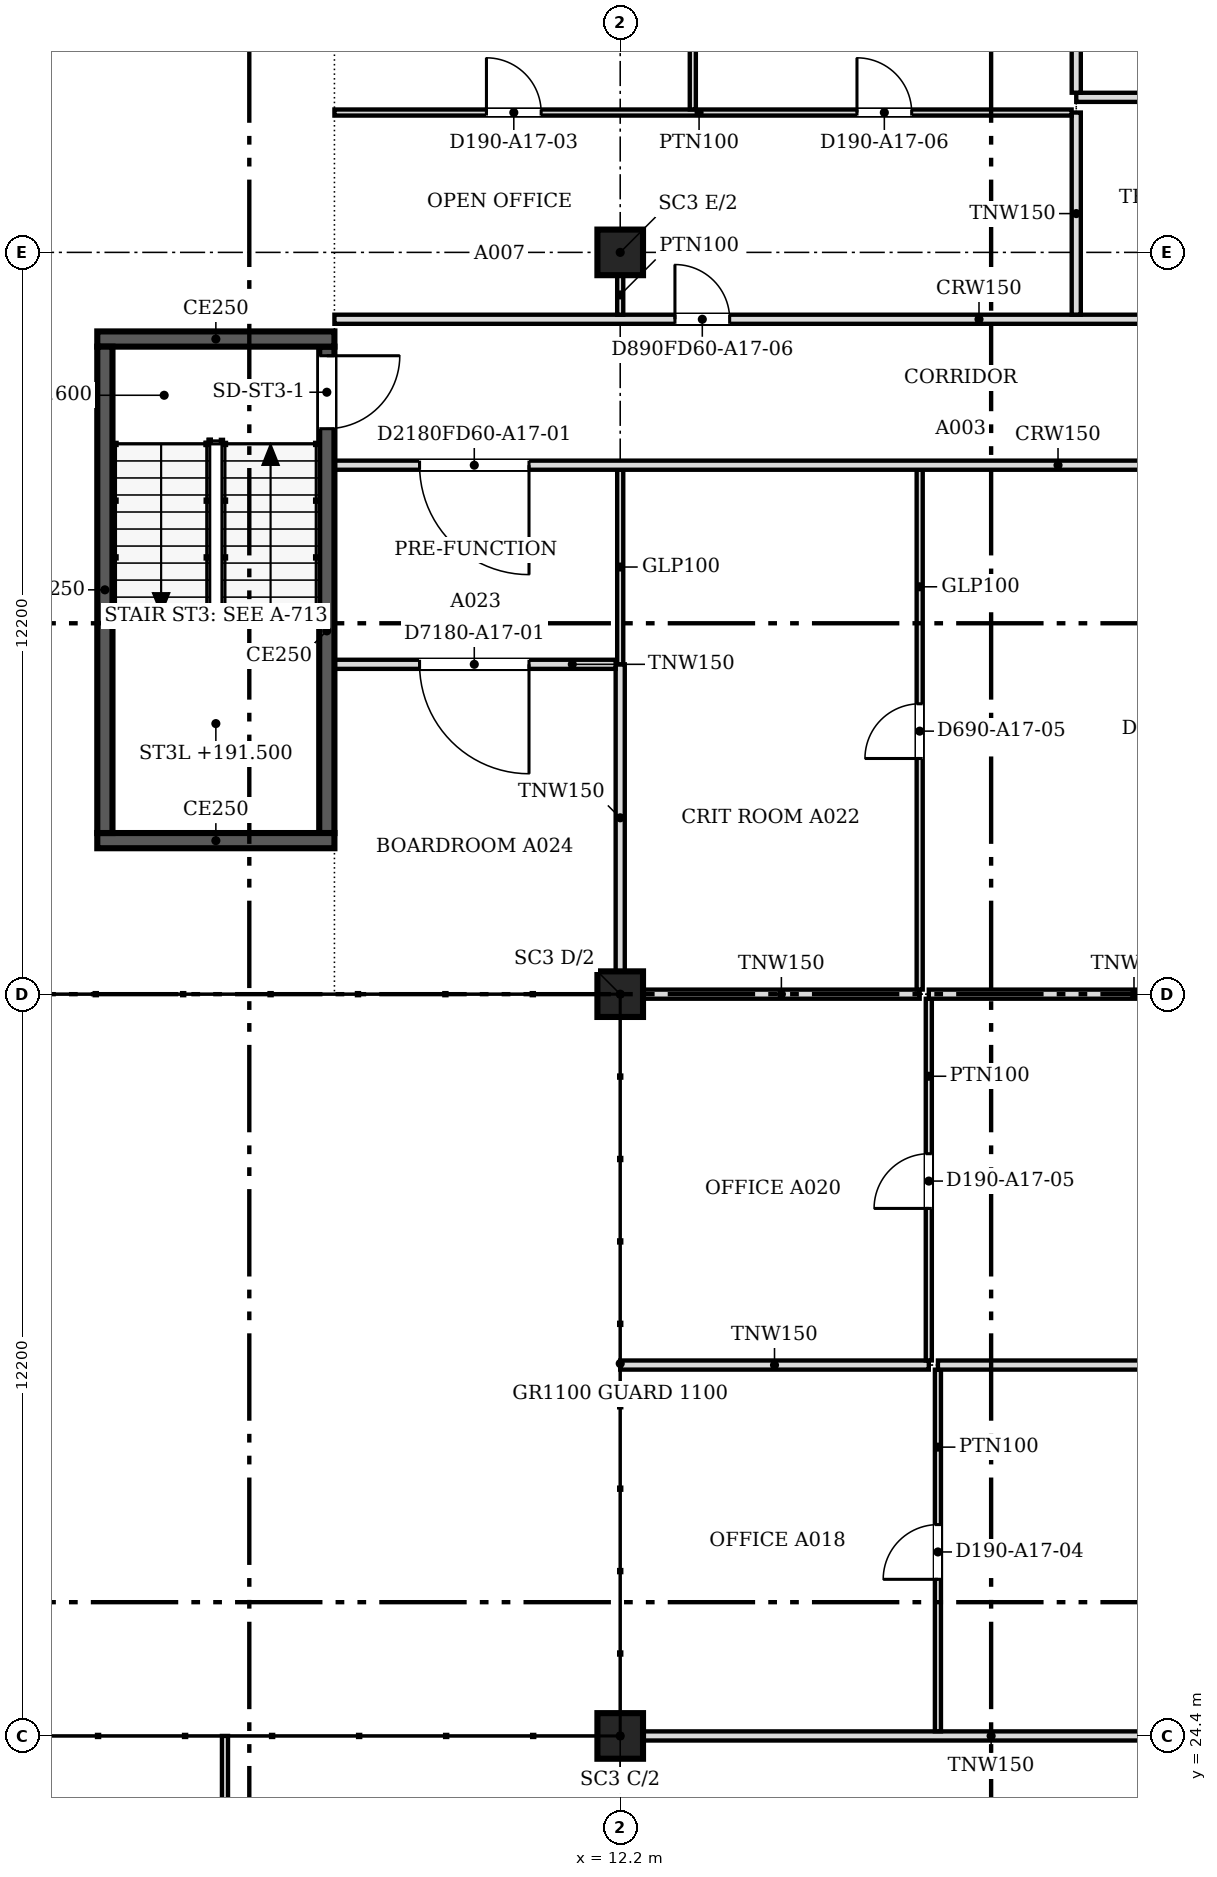
"""IFC4 building model, lengths in metres.
Left out: names, types, materials, properties, quantities, classifications, styles, units other than length and angle.
Written with IfcOpenShell. Run it as: python <this file> out.ifc"""

import sys

from ifc_helpers import new_model, si_unit, direction, frame, frame_2d, origin, origin_2d, place, context, subcontext, project, spatial, polyline, rectangle, outline, extrude, faceted_brep, source, transform, mapped, element, fill, save


model = new_model("IFC4")
c1 = context("Model", 3, precision=1e-05, world=origin(), true_north=direction((0.0, 1.0)))
c2 = subcontext(c1, "Body", "Model", "MODEL_VIEW")
j1 = project(units=[si_unit("LENGTHUNIT", "METRE"), si_unit("PLANEANGLEUNIT", "RADIAN")], contexts=[c1])
p1 = place(None, origin())
s1 = spatial("IfcSite", under=j1, at=p1, CompositionType="ELEMENT")
p2 = place(p1, origin())
s2 = spatial("IfcBuilding", under=s1, at=p2, CompositionType="ELEMENT")
p3 = place(p2, frame((0.0, 0.0, 189.6)))
s3 = spatial("IfcBuildingStorey", under=s2, at=p3, CompositionType="ELEMENT", Elevation=189.6)
for number, where, z_axis, x_axis in (
    (1, (12.2, 24.4, 0.0), (0.0, 0.0, 1.0), (1.0, 0.0, 0.0)),
    (2, (12.2, 36.6, 0.0), (0.0, 0.0, 1.0), (1.0, 0.0, 0.0)),
    (3, (12.2, 48.8, 0.0), (0.0, 0.0, 1.0), (1.0, 0.0, 0.0)),
):
    element("IfcColumn", number, at=place(p3, frame(where, z_axis=z_axis, x_axis=x_axis)), inside=s3, PredefinedType="COLUMN", context=c2, shape_type="SweptSolid", body=[
        extrude(rectangle(XDim=0.75, YDim=0.75, at=origin_2d()), origin(), (0.0, 0.0, 1.0), 3.55),
    ])
m1 = source(origin(), c2, "Body", "Brep", [
    faceted_brep([(0.053, -0.25, 0.0), (2.997, -0.25, 3.8), (0.053, -0.25, 7.6), (0.0, -0.25, 7.532), (0.0, -0.25, 0.068), (0.106, 0.25, 7.531), (2.944, 0.25, 3.868), (2.944, 0.25, 3.732), (0.106, 0.25, 0.068), (2.997, 0.0, 3.8), (0.053, 0.0, 0.0), (0.053, 0.0, 7.6)], [[[0, 1, 2, 3, 4]], [[5, 6, 7, 8]], [[8, 7, 9, 1, 0, 10]], [[6, 5, 11, 2, 1, 9]], [[3, 2, 11]], [[10, 0, 4]], [[8, 10, 4, 3, 11, 5]], [[7, 6, 9]]]),
])
p4 = place(p3, frame((3.431, 53.625, -3.8), z_axis=(0.0, 0.0, 1.0), x_axis=(-0.707106781187, -0.707106781187, 0.0)))
e4 = element("IfcWall", 4, at=p4, inside=s3, PredefinedType="SOLIDWALL", context=c2, shape_type="MappedRepresentation", body=[
    mapped(m1, transform((0.0, 0.0, 0.0), scale=1.0)),
])
m2 = source(origin(), c2, "Body", "SweptSolid", [
    extrude(outline(polyline([(0.253, 0.666), (2.681, 3.8), (0.253, 6.934), (0.253, 0.666)])), frame((0.0, 0.26, 0.0), z_axis=(0.0, -1.0, 0.0), x_axis=(1.0, 0.0, 0.0)), (0.0, 0.0, 1.0), 0.52),
])
p5 = place(p4, origin())
e5 = element("IfcOpeningElement", 5, at=p5, cuts=e4, PredefinedType="OPENING", context=c2, shape_type="MappedRepresentation", body=[
    mapped(m2, transform((0.0, 0.0, 0.0), scale=1.0)),
])
m3 = source(origin(), c2, "Body", "Brep", [
    faceted_brep([(2.944, -0.25, 0.0), (2.997, -0.25, 0.068), (2.997, -0.25, 3.8), (0.0, -0.25, 3.8), (0.053, 0.25, 3.8), (2.891, 0.25, 3.8), (2.891, 0.25, 0.068), (0.053, 0.25, 3.731), (2.944, 0.0, 0.0), (0.0, 0.0, 3.8)], [[[0, 1, 2, 3]], [[4, 5, 6, 7]], [[1, 0, 8]], [[5, 4, 9, 3, 2]], [[7, 6, 8, 0, 3, 9]], [[7, 9, 4]], [[1, 8, 6, 5, 2]]]),
])
p6 = place(p3, frame((3.394, 53.588, 0.0), z_axis=(0.0, 0.0, 1.0), x_axis=(-0.707106781187, -0.707106781187, 0.0)))
e6 = element("IfcWall", 6, at=p6, inside=s3, PredefinedType="SOLIDWALL", context=c2, shape_type="MappedRepresentation", body=[
    mapped(m3, transform((0.0, 0.0, 0.0), scale=1.0)),
])
m4 = source(origin(), c2, "Body", "SweptSolid", [
    extrude(outline(polyline([(2.744, 3.55), (0.51, 3.55), (2.744, 0.666), (2.744, 3.55)])), frame((0.0, 0.26, 0.0), z_axis=(0.0, -1.0, 0.0), x_axis=(1.0, 0.0, 0.0)), (0.0, 0.0, 1.0), 0.52),
])
p7 = place(p6, origin())
e7 = element("IfcOpeningElement", 7, at=p7, cuts=e6, PredefinedType="OPENING", context=c2, shape_type="MappedRepresentation", body=[
    mapped(m4, transform((0.0, 0.0, 0.0), scale=1.0)),
])
p8 = place(p3, frame((7.5, 39.125, 0.0), z_axis=(0.0, 0.0, 1.0), x_axis=(-1.0, 0.0, 0.0)))
e8 = element("IfcWall", 8, at=p8, inside=s3, PredefinedType="SOLIDWALL", context=c2, shape_type="SweptSolid", body=[
    extrude(rectangle(XDim=3.9, YDim=0.25, at=frame_2d((1.95, 0.0))), origin(), (0.0, 0.0, 1.0), 3.8),
])
p9 = place(p3, frame((3.725, 39.25, 0.0), z_axis=(0.0, 0.0, 1.0), x_axis=(0.0, 1.0, 0.0)))
e9 = element("IfcWall", 9, at=p9, inside=s3, PredefinedType="SOLIDWALL", context=c2, shape_type="SweptSolid", body=[
    extrude(rectangle(XDim=8.0, YDim=0.25, at=frame_2d((4.0, 0.0))), origin(), (0.0, 0.0, 1.0), 3.8),
])
p10 = place(p3, frame((3.6, 47.375, 0.0), z_axis=(0.0, 0.0, 1.0), x_axis=(1.0, 0.0, 0.0)))
e10 = element("IfcWall", 10, at=p10, inside=s3, PredefinedType="SOLIDWALL", context=c2, shape_type="SweptSolid", body=[
    extrude(rectangle(XDim=3.9, YDim=0.25, at=frame_2d((1.95, 0.0))), origin(), (0.0, 0.0, 1.0), 3.8),
])
p11 = place(p3, frame((7.375, 47.25, 0.0), z_axis=(0.0, 0.0, 1.0), x_axis=(0.0, -1.0, 0.0)))
e11 = element("IfcWall", 11, at=p11, inside=s3, PredefinedType="SOLIDWALL", context=c2, shape_type="SweptSolid", body=[
    extrude(rectangle(XDim=8.0, YDim=0.25, at=frame_2d((4.0, 0.0))), origin(), (0.0, 0.0, 1.0), 3.8),
])
m5 = source(origin(), c2, "Body", "SweptSolid", [
    extrude(rectangle(XDim=1.2, YDim=2.1, at=frame_2d((0.6, 1.05))), frame((0.0, 0.135, 0.0), z_axis=(0.0, -1.0, 0.0), x_axis=(1.0, 0.0, 0.0)), (0.0, 0.0, 1.0), 0.27),
])
p12 = place(p11, frame((0.15, 0.0, 0.0)))
e12 = element("IfcOpeningElement", 12, at=p12, cuts=e11, PredefinedType="OPENING", context=c2, shape_type="MappedRepresentation", body=[
    mapped(m5, transform((0.0, 0.0, 0.0), scale=1.0)),
])
p13 = place(p3, frame((5.7, 18.99, 0.0), z_axis=(0.0, 0.0, 1.0), x_axis=(0.0, 1.0, 0.0)))
e13 = element("IfcWall", 13, at=p13, inside=s3, PredefinedType="PARTITIONING", context=c2, shape_type="SweptSolid", body=[
    extrude(rectangle(XDim=5.41, YDim=0.1, at=frame_2d((2.705, 0.0))), origin(), (0.0, 0.0, 1.0), 2.947),
])
m6 = source(origin(), c2, "Body", "SweptSolid", [
    extrude(rectangle(XDim=0.9, YDim=2.1, at=frame_2d((0.45, 1.05))), frame((0.0, 0.06, 0.0), z_axis=(0.0, -1.0, 0.0), x_axis=(1.0, 0.0, 0.0)), (0.0, 0.0, 1.0), 0.12),
])
p14 = place(p13, frame((2.3, 0.0, 0.0)))
e14 = element("IfcOpeningElement", 14, at=p14, cuts=e13, PredefinedType="OPENING", context=c2, shape_type="MappedRepresentation", body=[
    mapped(m6, transform((0.0, 0.0, 0.0), scale=1.0)),
])
p15 = place(p3, frame((12.576, 24.4, 0.0), z_axis=(0.0, 0.0, 1.0), x_axis=(1.0, 0.0, 0.0)))
e15 = element("IfcWall", 15, at=p15, inside=s3, PredefinedType="PARTITIONING", context=c2, shape_type="SweptSolid", body=[
    extrude(rectangle(XDim=11.448, YDim=0.15, at=frame_2d((5.724, 0.0))), origin(), (0.0, 0.0, 1.0), 2.947),
])
p16 = place(p3, frame((17.425, 24.476, 0.0), z_axis=(0.0, 0.0, 1.0), x_axis=(0.0, 1.0, 0.0)))
e16 = element("IfcWall", 16, at=p16, inside=s3, PredefinedType="PARTITIONING", context=c2, shape_type="SweptSolid", body=[
    extrude(rectangle(XDim=5.948, YDim=0.1, at=frame_2d((2.974, 0.0))), origin(), (0.0, 0.0, 1.0), 2.947),
])
p17 = place(p16, frame((2.5, 0.0, 0.0)))
e17 = element("IfcOpeningElement", 17, at=p17, cuts=e16, PredefinedType="OPENING", context=c2, shape_type="MappedRepresentation", body=[
    mapped(m6, transform((0.0, 0.0, 0.0), scale=1.0)),
])
p18 = place(p3, frame((12.2, 30.5, 0.0), z_axis=(0.0, 0.0, 1.0), x_axis=(1.0, 0.0, 0.0)))
e18 = element("IfcWall", 18, at=p18, inside=s3, PredefinedType="PARTITIONING", context=c2, shape_type="SweptSolid", body=[
    extrude(rectangle(XDim=5.075, YDim=0.15, at=frame_2d((2.538, 0.0))), origin(), (0.0, 0.0, 1.0), 2.947),
])
p19 = place(p3, frame((17.425, 30.5, 0.0), z_axis=(0.0, 0.0, 1.0), x_axis=(1.0, 0.0, 0.0)))
e19 = element("IfcWall", 19, at=p19, inside=s3, PredefinedType="PARTITIONING", context=c2, shape_type="SweptSolid", body=[
    extrude(rectangle(XDim=10.599, YDim=0.15, at=frame_2d((5.299, 0.0))), origin(), (0.0, 0.0, 1.0), 2.947),
])
p20 = place(p3, frame((17.275, 30.576, 0.0), z_axis=(0.0, 0.0, 1.0), x_axis=(0.0, 1.0, 0.0)))
e20 = element("IfcWall", 20, at=p20, inside=s3, PredefinedType="PARTITIONING", context=c2, shape_type="SweptSolid", body=[
    extrude(rectangle(XDim=5.948, YDim=0.1, at=frame_2d((2.974, 0.0))), origin(), (0.0, 0.0, 1.0), 2.947),
])
p21 = place(p20, frame((2.5, 0.0, 0.0)))
e21 = element("IfcOpeningElement", 21, at=p21, cuts=e20, PredefinedType="OPENING", context=c2, shape_type="MappedRepresentation", body=[
    mapped(m6, transform((0.0, 0.0, 0.0), scale=1.0)),
])
p22 = place(p3, frame((12.576, 36.6, 0.0), z_axis=(0.0, 0.0, 1.0), x_axis=(1.0, 0.0, 0.0)))
e22 = element("IfcWall", 22, at=p22, inside=s3, PredefinedType="PARTITIONING", context=c2, shape_type="SweptSolid", body=[
    extrude(rectangle(XDim=4.549, YDim=0.15, at=frame_2d((2.274, 0.0))), origin(), (0.0, 0.0, 1.0), 2.947),
])
p23 = place(p3, frame((17.275, 36.6, 0.0), z_axis=(0.0, 0.0, 1.0), x_axis=(1.0, 0.0, 0.0)))
e23 = element("IfcWall", 23, at=p23, inside=s3, PredefinedType="PARTITIONING", context=c2, shape_type="SweptSolid", body=[
    extrude(rectangle(XDim=6.749, YDim=0.15, at=frame_2d((3.375, 0.0))), origin(), (0.0, 0.0, 1.0), 2.947),
])
p24 = place(p3, frame((17.125, 36.676, 0.0), z_axis=(0.0, 0.0, 1.0), x_axis=(0.0, 1.0, 0.0)))
e24 = element("IfcWall", 24, at=p24, inside=s3, PredefinedType="PARTITIONING", context=c2, shape_type="SweptSolid", body=[
    extrude(rectangle(XDim=8.548, YDim=0.1, at=frame_2d((4.274, 0.0))), origin(), (0.0, 0.0, 1.0), 2.947),
])
p25 = place(p24, frame((3.8, 0.0, 0.0)))
e25 = element("IfcOpeningElement", 25, at=p25, cuts=e24, PredefinedType="OPENING", context=c2, shape_type="MappedRepresentation", body=[
    mapped(m6, transform((0.0, 0.0, 0.0), scale=1.0)),
])
p26 = place(p3, frame((12.2, 36.976, 0.0), z_axis=(0.0, 0.0, 1.0), x_axis=(0.0, 1.0, 0.0)))
e26 = element("IfcWall", 26, at=p26, inside=s3, PredefinedType="PARTITIONING", context=c2, shape_type="SweptSolid", body=[
    extrude(rectangle(XDim=5.049, YDim=0.15, at=frame_2d((2.524, 0.0))), origin(), (0.0, 0.0, 1.0), 2.947),
])
p27 = place(p3, frame((12.124, 42.025, 0.0), z_axis=(0.0, 0.0, 1.0), x_axis=(-1.0, 0.0, 0.0)))
e27 = element("IfcWall", 27, at=p27, inside=s3, PredefinedType="PARTITIONING", context=c2, shape_type="SweptSolid", body=[
    extrude(rectangle(XDim=4.624, YDim=0.15, at=frame_2d((2.312, 0.0))), origin(), (0.0, 0.0, 1.0), 2.947),
])
m7 = source(origin(), c2, "Body", "SweptSolid", [
    extrude(rectangle(XDim=1.8, YDim=2.1, at=frame_2d((0.9, 1.05))), frame((0.0, 0.085, 0.0), z_axis=(0.0, -1.0, 0.0), x_axis=(1.0, 0.0, 0.0)), (0.0, 0.0, 1.0), 0.17),
])
p28 = place(p27, frame((1.424, 0.0, 0.0)))
e28 = element("IfcOpeningElement", 28, at=p28, cuts=e27, PredefinedType="OPENING", context=c2, shape_type="MappedRepresentation", body=[
    mapped(m7, transform((0.0, 0.0, 0.0), scale=1.0)),
])
p29 = place(p3, frame((12.2, 42.026, 0.0), z_axis=(0.0, 0.0, 1.0), x_axis=(0.0, 1.0, 0.0)))
e29 = element("IfcWall", 29, at=p29, inside=s3, PredefinedType="PARTITIONING", context=c2, shape_type="SweptSolid", body=[
    extrude(rectangle(XDim=3.198, YDim=0.1, at=frame_2d((1.599, 0.0))), origin(), (0.0, 0.0, 1.0), 2.947),
])
p30 = place(p3, frame((28.1, 45.3, 0.0), z_axis=(0.0, 0.0, 1.0), x_axis=(-1.0, 0.0, 0.0)))
e30 = element("IfcWall", 30, at=p30, inside=s3, PredefinedType="PARTITIONING", context=c2, shape_type="SweptSolid", body=[
    extrude(rectangle(XDim=20.6, YDim=0.15, at=frame_2d((10.3, 0.0))), origin(), (0.0, 0.0, 1.0), 2.947),
])
p31 = place(p30, frame((17.4, 0.0, 0.0)))
e31 = element("IfcOpeningElement", 31, at=p31, cuts=e30, PredefinedType="OPENING", context=c2, shape_type="MappedRepresentation", body=[
    mapped(m7, transform((0.0, 0.0, 0.0), scale=1.0)),
])
p32 = place(p3, frame((7.5, 47.7, 0.0), z_axis=(0.0, 0.0, 1.0), x_axis=(1.0, 0.0, 0.0)))
e32 = element("IfcWall", 32, at=p32, inside=s3, PredefinedType="PARTITIONING", context=c2, shape_type="SweptSolid", body=[
    extrude(rectangle(XDim=20.6, YDim=0.15, at=frame_2d((10.3, 0.0))), origin(), (0.0, 0.0, 1.0), 2.947),
])
p33 = place(p32, frame((14.701, 0.0, 0.0)))
e33 = element("IfcOpeningElement", 33, at=p33, cuts=e32, PredefinedType="OPENING", context=c2, shape_type="MappedRepresentation", body=[
    mapped(m7, transform((0.0, 0.0, 0.0), scale=1.0)),
])
m8 = source(origin(), c2, "Body", "SweptSolid", [
    extrude(rectangle(XDim=0.9, YDim=2.1, at=frame_2d((0.45, 1.05))), frame((0.0, 0.085, 0.0), z_axis=(0.0, -1.0, 0.0), x_axis=(1.0, 0.0, 0.0)), (0.0, 0.0, 1.0), 0.17),
])
p34 = place(p32, frame((5.6, 0.0, 0.0)))
e34 = element("IfcOpeningElement", 34, at=p34, cuts=e32, PredefinedType="OPENING", context=c2, shape_type="MappedRepresentation", body=[
    mapped(m8, transform((0.0, 0.0, 0.0), scale=1.0)),
])
p35 = place(p3, frame((19.7, 47.776, 0.0), z_axis=(0.0, 0.0, 1.0), x_axis=(0.0, 1.0, 0.0)))
e35 = element("IfcWall", 35, at=p35, inside=s3, PredefinedType="PARTITIONING", context=c2, shape_type="SweptSolid", body=[
    extrude(rectangle(XDim=3.324, YDim=0.15, at=frame_2d((1.662, 0.0))), origin(), (0.0, 0.0, 1.0), 2.947),
])
p36 = place(p3, frame((12.2, 48.425, 0.0), z_axis=(0.0, 0.0, 1.0), x_axis=(0.0, -1.0, 0.0)))
e36 = element("IfcWall", 36, at=p36, inside=s3, PredefinedType="PARTITIONING", context=c2, shape_type="SweptSolid", body=[
    extrude(rectangle(XDim=0.65, YDim=0.1, at=frame_2d((0.325, 0.0))), origin(), (0.0, 0.0, 1.0), 2.947),
])
p37 = place(p3, frame((7.5, 51.1, 0.0), z_axis=(0.0, 0.0, 1.0), x_axis=(1.0, 0.0, 0.0)))
e37 = element("IfcWall", 37, at=p37, inside=s3, PredefinedType="PARTITIONING", context=c2, shape_type="SweptSolid", body=[
    extrude(rectangle(XDim=12.124, YDim=0.1, at=frame_2d((6.062, 0.0))), origin(), (0.0, 0.0, 1.0), 2.947),
])
p38 = place(p37, frame((2.5, 0.0, 0.0)))
e38 = element("IfcOpeningElement", 38, at=p38, cuts=e37, PredefinedType="OPENING", context=c2, shape_type="MappedRepresentation", body=[
    mapped(m6, transform((0.0, 0.0, 0.0), scale=1.0)),
])
p39 = place(p37, frame((8.594, 0.0, 0.0)))
e39 = element("IfcOpeningElement", 39, at=p39, cuts=e37, PredefinedType="OPENING", context=c2, shape_type="MappedRepresentation", body=[
    mapped(m6, transform((0.0, 0.0, 0.0), scale=1.0)),
])
p40 = place(p3, frame((13.394, 51.151, 0.0), z_axis=(0.0, 0.0, 1.0), x_axis=(0.0, 1.0, 0.0)))
e40 = element("IfcWall", 40, at=p40, inside=s3, PredefinedType="PARTITIONING", context=c2, shape_type="SweptSolid", body=[
    extrude(rectangle(XDim=3.249, YDim=0.1, at=frame_2d((1.625, 0.0))), origin(), (0.0, 0.0, 1.0), 2.947),
])
p41 = place(p3, frame((19.7, 51.35, 0.0), z_axis=(0.0, 0.0, 1.0), x_axis=(1.0, 0.0, 0.0)))
e41 = element("IfcWall", 41, at=p41, inside=s3, PredefinedType="PARTITIONING", context=c2, shape_type="SweptSolid", body=[
    extrude(rectangle(XDim=8.4, YDim=0.15, at=frame_2d((4.2, 0.0))), origin(), (0.0, 0.0, 1.0), 2.947),
])
p42 = place(p41, frame((3.7, 0.0, 0.0)))
e42 = element("IfcOpeningElement", 42, at=p42, cuts=e41, PredefinedType="OPENING", context=c2, shape_type="MappedRepresentation", body=[
    mapped(m8, transform((0.0, 0.0, 0.0), scale=1.0)),
])
p43 = place(p3, frame((19.7, 51.426, 0.0), z_axis=(0.0, 0.0, 1.0), x_axis=(0.0, 1.0, 0.0)))
e43 = element("IfcWall", 43, at=p43, inside=s3, PredefinedType="PARTITIONING", context=c2, shape_type="SweptSolid", body=[
    extrude(rectangle(XDim=2.974, YDim=0.15, at=frame_2d((1.487, 0.0))), origin(), (0.0, 0.0, 1.0), 2.947),
])
m9 = source(origin(), c2, "Body", "SweptSolid", [
    extrude(rectangle(XDim=1.2, YDim=2.1, at=frame_2d((0.6, 1.05))), frame((0.0, 0.025, 0.0), z_axis=(0.0, -1.0, 0.0), x_axis=(1.0, 0.0, 0.0)), (0.0, 0.0, 1.0), 0.05),
])
p44 = place(p12, origin())
e44 = element("IfcDoor", 44, at=p44, inside=s3, OperationType="SINGLE_SWING_LEFT", PredefinedType="DOOR", context=c2, shape_type="MappedRepresentation", body=[
    mapped(m9, transform((0.0, 0.0, 0.0), scale=1.0)),
])
fill(e12, e44)
m10 = source(origin(), c2, "Body", "SweptSolid", [
    extrude(rectangle(XDim=1.8, YDim=2.1, at=frame_2d((0.9, 1.05))), frame((0.0, 0.025, 0.0), z_axis=(0.0, -1.0, 0.0), x_axis=(1.0, 0.0, 0.0)), (0.0, 0.0, 1.0), 0.05),
])
p45 = place(p28, origin())
e45 = element("IfcDoor", 45, at=p45, inside=s3, OperationType="DOUBLE_DOOR_SINGLE_SWING", PredefinedType="DOOR", context=c2, shape_type="MappedRepresentation", body=[
    mapped(m10, transform((0.0, 0.0, 0.0), scale=1.0)),
])
fill(e28, e45)
p46 = place(p31, origin())
e46 = element("IfcDoor", 46, at=p46, inside=s3, OperationType="DOUBLE_DOOR_SINGLE_SWING", PredefinedType="DOOR", context=c2, shape_type="MappedRepresentation", body=[
    mapped(m10, transform((0.0, 0.0, 0.0), scale=1.0)),
])
fill(e31, e46)
m11 = source(origin(), c2, "Body", "SweptSolid", [
    extrude(rectangle(XDim=0.9, YDim=2.1, at=frame_2d((0.45, 1.05))), frame((0.0, 0.025, 0.0), z_axis=(0.0, -1.0, 0.0), x_axis=(1.0, 0.0, 0.0)), (0.0, 0.0, 1.0), 0.05),
])
p47 = place(p38, origin())
e47 = element("IfcDoor", 47, at=p47, inside=s3, OperationType="SINGLE_SWING_LEFT", PredefinedType="DOOR", context=c2, shape_type="MappedRepresentation", body=[
    mapped(m11, transform((0.0, 0.0, 0.0), scale=1.0)),
])
fill(e38, e47)
p48 = place(p17, origin())
e48 = element("IfcDoor", 48, at=p48, inside=s3, OperationType="SINGLE_SWING_LEFT", PredefinedType="DOOR", context=c2, shape_type="MappedRepresentation", body=[
    mapped(m11, transform((0.0, 0.0, 0.0), scale=1.0)),
])
fill(e17, e48)
p49 = place(p21, origin())
e49 = element("IfcDoor", 49, at=p49, inside=s3, OperationType="SINGLE_SWING_LEFT", PredefinedType="DOOR", context=c2, shape_type="MappedRepresentation", body=[
    mapped(m11, transform((0.0, 0.0, 0.0), scale=1.0)),
])
fill(e21, e49)
p50 = place(p39, origin())
e50 = element("IfcDoor", 50, at=p50, inside=s3, OperationType="SINGLE_SWING_LEFT", PredefinedType="DOOR", context=c2, shape_type="MappedRepresentation", body=[
    mapped(m11, transform((0.0, 0.0, 0.0), scale=1.0)),
])
fill(e39, e50)
p51 = place(p25, origin())
e51 = element("IfcDoor", 51, at=p51, inside=s3, OperationType="SINGLE_SWING_LEFT", PredefinedType="DOOR", context=c2, shape_type="MappedRepresentation", body=[
    mapped(m11, transform((0.0, 0.0, 0.0), scale=1.0)),
])
fill(e25, e51)
p52 = place(p34, origin())
e52 = element("IfcDoor", 52, at=p52, inside=s3, OperationType="SINGLE_SWING_LEFT", PredefinedType="DOOR", context=c2, shape_type="MappedRepresentation", body=[
    mapped(m11, transform((0.0, 0.0, 0.0), scale=1.0)),
])
fill(e34, e52)
save(model, sys.argv[1])
